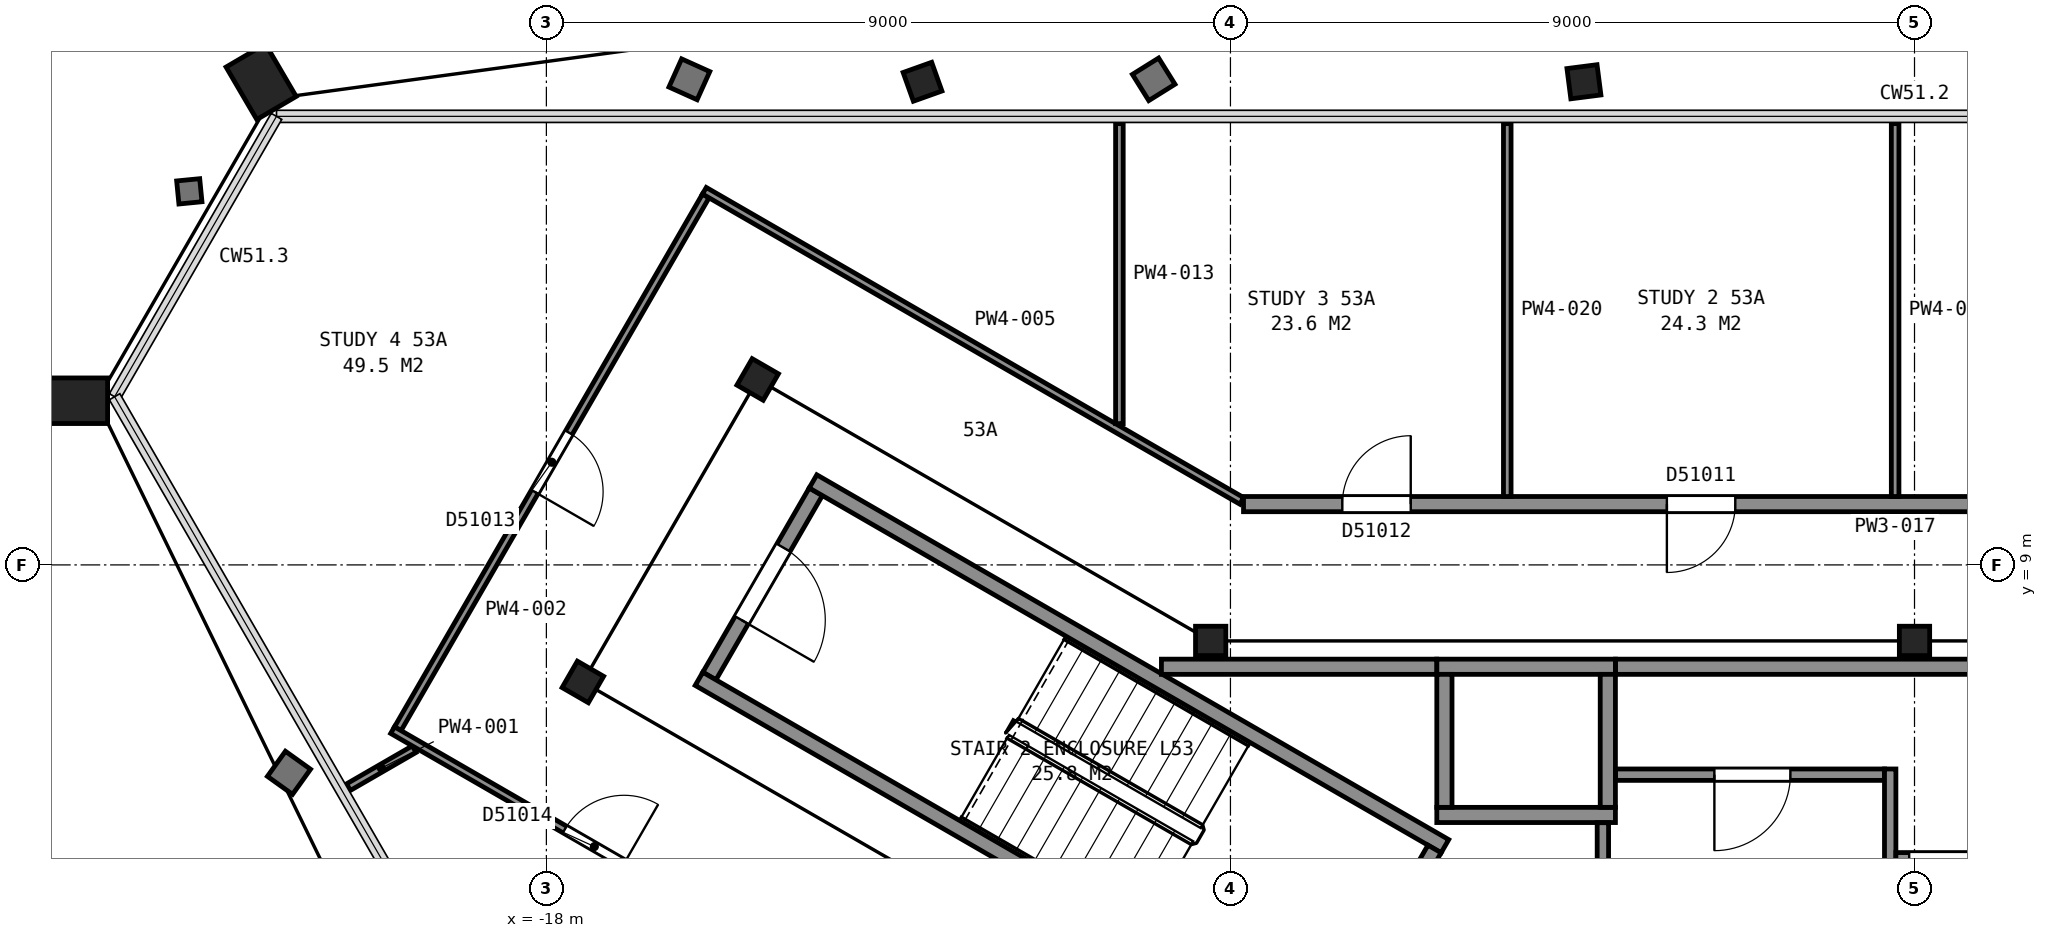
"""IFC4 building model, lengths in metres.
Left out: names, types, materials, properties, quantities, classifications, styles, units other than length and angle.
Written with IfcOpenShell. Run it as: python <this file> out.ifc"""

import sys

from ifc_helpers import new_model, si_unit, direction, frame, frame_2d, origin, origin_2d, place, context, subcontext, project, spatial, rectangle, hollow_rectangle, i_section, extrude, element, fill, save


model = new_model("IFC4")
c1 = context("Model", 3, precision=1e-05, world=origin(), true_north=direction((0.0, 1.0)))
c2 = subcontext(c1, "Body", "Model", "MODEL_VIEW")
j1 = project(units=[si_unit("LENGTHUNIT", "METRE"), si_unit("PLANEANGLEUNIT", "RADIAN")], contexts=[c1])
p1 = place(None, origin())
s1 = spatial("IfcSite", under=j1, at=p1, CompositionType="ELEMENT")
p2 = place(p1, origin())
s2 = spatial("IfcBuilding", under=s1, at=p2, CompositionType="ELEMENT")
p3 = place(p2, frame((0.0, 0.0, 213.8)))
s3 = spatial("IfcBuildingStorey", under=s2, at=p3, CompositionType="ELEMENT", Elevation=213.8)
p4 = place(p3, frame((-4.321, 15.137, 0.035), z_axis=(-0.023914784976, 0.185835055632, 0.982289883465), x_axis=(0.999704292693, 0.000115278447, 0.024316946377)))
e1 = element("IfcColumn", 1, at=p4, inside=s3, PredefinedType="COLUMN", context=c2, shape_type="SweptSolid", body=[
    extrude(i_section(OverallWidth=0.401, OverallDepth=0.399, WebThickness=0.025, FlangeThickness=0.04, FilletRadius=0.015, at=origin_2d()), origin(), (0.0, 0.0, 1.0), 3.696),
])
p5 = place(p3, frame((-12.973, 15.138, 0.04), z_axis=(-0.066255705929, 0.185476302527, 0.980412526762), x_axis=(0.997725155976, 6.7197846e-05, 0.067412970684)))
e2 = element("IfcColumn", 2, at=p5, inside=s3, PredefinedType="COLUMN", context=c2, shape_type="SweptSolid", body=[
    extrude(i_section(OverallWidth=0.401, OverallDepth=0.399, WebThickness=0.025, FlangeThickness=0.04, FilletRadius=0.015, at=origin_2d()), origin(), (0.0, 0.0, 1.0), 3.692),
])
p6 = place(p3, frame((-21.627, 15.142, 0.065), z_axis=(-0.108214891267, 0.184766906942, 0.976806391977), x_axis=(0.497103756844, 0.860970557833, -0.107784755309)))
e3 = element("IfcColumn", 3, at=p6, inside=s3, PredefinedType="COLUMN", context=c2, shape_type="SweptSolid", body=[
    extrude(hollow_rectangle(XDim=0.6, YDim=0.8, WallThickness=0.05, at=origin_2d()), origin(), (0.0, 0.0, 1.0), 3.655),
])
p7 = place(p3, frame((-23.924, 11.16, 0.065), z_axis=(-0.213838328366, 0.0, 0.976869064574), x_axis=(0.497033455356, 0.860883256594, 0.10880148332)))
e4 = element("IfcColumn", 4, at=p7, inside=s3, PredefinedType="COLUMN", context=c2, shape_type="SweptSolid", body=[
    extrude(hollow_rectangle(XDim=0.6, YDim=0.8, WallThickness=0.05, at=origin_2d()), origin(), (0.0, 0.0, 1.0), 3.655),
])
for number, where, z_axis, x_axis in (
    (5, (0.0, 8.0, 0.0), (0.0, 0.0, 1.0), (1.0, 0.0, 0.0)),
    (6, (-9.26, 8.0, 0.0), (0.0, 0.0, 1.0), (1.0, 0.0, 0.0)),
):
    element("IfcColumn", number, at=place(p3, frame(where, z_axis=z_axis, x_axis=x_axis)), inside=s3, PredefinedType="COLUMN", context=c2, shape_type="SweptSolid", body=[
        extrude(i_section(OverallWidth=0.399, OverallDepth=0.386, WebThickness=0.021, FlangeThickness=0.033, FilletRadius=0.015, at=origin_2d()), origin(), (0.0, 0.0, 1.0), 3.7),
    ])
for number, where, z_axis, x_axis in (
    (7, (-15.22, 11.44, 0.0), (0.0, 0.0, 1.0), (0.5, 0.866, 0.0)),
    (8, (-17.52, 7.46, 0.0), (0.0, 0.0, 1.0), (0.5, 0.866, 0.0)),
):
    element("IfcColumn", number, at=place(p3, frame(where, z_axis=z_axis, x_axis=x_axis)), inside=s3, PredefinedType="COLUMN", context=c2, shape_type="SweptSolid", body=[
        extrude(i_section(OverallWidth=0.401, OverallDepth=0.399, WebThickness=0.025, FlangeThickness=0.04, FilletRadius=0.015, at=origin_2d()), origin(), (0.0, 0.0, 1.0), 3.7),
    ])
p8 = place(p3, frame((-14.455, 9.962, 0.0), z_axis=(0.0, 0.0, 1.0), x_axis=(-0.500049511043, -0.865996816683, 0.0)))
e9 = element("IfcWall", 9, at=p8, inside=s3, PredefinedType="PARTITIONING", context=c2, shape_type="SweptSolid", body=[
    extrude(rectangle(XDim=2.8, YDim=0.2, at=frame_2d((1.4, 0.0))), origin(), (0.0, 0.0, 1.0), 3.45),
])
p9 = place(p8, frame((0.85, 0.0, 0.0)))
e10 = element("IfcOpeningElement", 10, at=p9, cuts=e9, PredefinedType="OPENING", context=c2, shape_type="SweptSolid", body=[
    extrude(rectangle(XDim=1.1, YDim=2.1, at=frame_2d((0.55, 1.05))), frame((0.0, 0.11, 0.0), z_axis=(0.0, -1.0, 0.0), x_axis=(1.0, 0.0, 0.0)), (0.0, 0.0, 1.0), 0.22),
])
for number, where, z_axis, x_axis in (
    (11, (-7.678, 2.701, 0.0), (0.0, 0.0, 1.0), (-0.866, 0.5, 0.0)),
    (12, (-6.178, 5.299, 0.0), (0.0, 0.0, 1.0), (-0.866, 0.5, 0.0)),
):
    element("IfcWall", number, at=place(p3, frame(where, z_axis=z_axis, x_axis=x_axis)), inside=s3, PredefinedType="PARTITIONING", context=c2, shape_type="SweptSolid", body=[
        extrude(rectangle(XDim=9.6, YDim=0.2, at=frame_2d((4.8, 0.0))), origin(), (0.0, 0.0, 1.0), 3.45),
    ])
p10 = place(p3, frame((-6.315, 5.262, 0.0), z_axis=(0.0, 0.0, 1.0), x_axis=(-0.500049511043, -0.865996816683, 0.0)))
e13 = element("IfcWall", 13, at=p10, inside=s3, PredefinedType="PARTITIONING", context=c2, shape_type="SweptSolid", body=[
    extrude(rectangle(XDim=2.8, YDim=0.2, at=frame_2d((1.4, 0.0))), origin(), (0.0, 0.0, 1.0), 3.45),
])
for number, where, z_axis, x_axis in (
    (14, (-6.285, 5.71, 0.0), (0.0, 0.0, 1.0), (1.0, 0.0, 0.0)),
    (15, (-6.285, 7.66, 0.0), (0.0, 0.0, 1.0), (1.0, 0.0, 0.0)),
):
    element("IfcWall", number, at=place(p3, frame(where, z_axis=z_axis, x_axis=x_axis)), inside=s3, PredefinedType="PARTITIONING", context=c2, shape_type="SweptSolid", body=[
        extrude(rectangle(XDim=2.35, YDim=0.2, at=frame_2d((1.175, 0.0))), origin(), (0.0, 0.0, 1.0), 3.7),
    ])
for number, where, z_axis, x_axis in (
    (16, (-4.035, 5.81, 0.0), (0.0, 0.0, 1.0), (0.0, 1.0, 0.0)),
    (17, (-6.185, 5.81, 0.0), (0.0, 0.0, 1.0), (0.0, 1.0, 0.0)),
):
    element("IfcWall", number, at=place(p3, frame(where, z_axis=z_axis, x_axis=x_axis)), inside=s3, PredefinedType="PARTITIONING", context=c2, shape_type="SweptSolid", body=[
        extrude(rectangle(XDim=1.75, YDim=0.2, at=frame_2d((0.875, 0.0))), origin(), (0.0, 0.0, 1.0), 3.7),
    ])
p11 = place(p3, frame((-9.908, 7.66, 0.0), z_axis=(0.0, 0.0, 1.0), x_axis=(1.0, 0.0, 0.0)))
e18 = element("IfcWall", 18, at=p11, inside=s3, PredefinedType="PARTITIONING", context=c2, shape_type="SweptSolid", body=[
    extrude(rectangle(XDim=3.621, YDim=0.2, at=frame_2d((1.811, 0.0))), origin(), (0.0, 0.0, 1.0), 3.45),
])
p12 = place(p3, frame((-4.1, 2.085, 0.0), z_axis=(0.0, 0.0, 1.0), x_axis=(0.0, 1.0, 0.0)))
e19 = element("IfcWall", 19, at=p12, inside=s3, PredefinedType="PARTITIONING", context=c2, shape_type="SweptSolid", body=[
    extrude(rectangle(XDim=3.523, YDim=0.15, at=frame_2d((1.761, 0.0))), origin(), (0.0, 0.0, 1.0), 3.45),
])
p13 = place(p3, frame((-3.933, 6.24, 0.0), z_axis=(0.0, 0.0, 1.0), x_axis=(1.0, 0.0, 0.0)))
e20 = element("IfcWall", 20, at=p13, inside=s3, PredefinedType="PARTITIONING", context=c2, shape_type="SweptSolid", body=[
    extrude(rectangle(XDim=3.538, YDim=0.15, at=frame_2d((1.769, 0.0))), origin(), (0.0, 0.0, 1.0), 3.45),
])
p14 = place(p13, frame((1.3, 0.0, 0.0)))
e21 = element("IfcOpeningElement", 21, at=p14, cuts=e20, PredefinedType="OPENING", context=c2, shape_type="SweptSolid", body=[
    extrude(rectangle(XDim=1.0, YDim=2.1, at=frame_2d((0.5, 1.05))), frame((0.0, 0.085, 0.0), z_axis=(0.0, -1.0, 0.0), x_axis=(1.0, 0.0, 0.0)), (0.0, 0.0, 1.0), 0.17),
])
p15 = place(p3, frame((-3.933, 7.66, 0.0), z_axis=(0.0, 0.0, 1.0), x_axis=(1.0, 0.0, 0.0)))
e22 = element("IfcWall", 22, at=p15, inside=s3, PredefinedType="PARTITIONING", context=c2, shape_type="SweptSolid", body=[
    extrude(rectangle(XDim=13.841, YDim=0.2, at=frame_2d((6.92, 0.0))), origin(), (0.0, 0.0, 1.0), 3.45),
])
p16 = place(p3, frame((-0.32, 2.252, 0.0), z_axis=(0.0, 0.0, 1.0), x_axis=(0.0, 1.0, 0.0)))
e23 = element("IfcWall", 23, at=p16, inside=s3, PredefinedType="PARTITIONING", context=c2, shape_type="SweptSolid", body=[
    extrude(rectangle(XDim=4.063, YDim=0.15, at=frame_2d((2.031, 0.0))), origin(), (0.0, 0.0, 1.0), 3.45),
])
p17 = place(p3, frame((-0.245, 5.14, 0.0), z_axis=(0.0, 0.0, 1.0), x_axis=(1.0, 0.0, 0.0)))
e24 = element("IfcWall", 24, at=p17, inside=s3, PredefinedType="PARTITIONING", context=c2, shape_type="SweptSolid", body=[
    extrude(rectangle(XDim=5.11, YDim=0.15, at=frame_2d((2.555, 0.0))), origin(), (0.0, 0.0, 1.0), 3.45),
])
p18 = place(p17, frame((0.175, 0.0, 0.0)))
e25 = element("IfcOpeningElement", 25, at=p18, cuts=e24, PredefinedType="OPENING", context=c2, shape_type="SweptSolid", body=[
    extrude(rectangle(XDim=1.0, YDim=2.1, at=frame_2d((0.5, 1.05))), frame((0.0, 0.085, 0.0), z_axis=(0.0, -1.0, 0.0), x_axis=(1.0, 0.0, 0.0)), (0.0, 0.0, 1.0), 0.17),
])
p19 = place(p3, frame((-20.604, 6.076, 0.0), z_axis=(0.0, 0.0, 1.0), x_axis=(0.865855657918, 0.500293893279, 0.0)))
e26 = element("IfcWall", 26, at=p19, inside=s3, PredefinedType="PARTITIONING", context=c2, shape_type="SweptSolid", body=[
    extrude(rectangle(XDim=0.999, YDim=0.1, at=frame_2d((0.499, 0.0))), origin(), (0.0, 0.0, 1.0), 2.713),
])
p20 = place(p3, frame((-19.955, 6.844, 0.0), z_axis=(0.0, 0.0, 1.0), x_axis=(0.500415732313, 0.865785247537, 0.0)))
e27 = element("IfcWall", 27, at=p20, inside=s3, PredefinedType="PARTITIONING", context=c2, shape_type="SweptSolid", body=[
    extrude(rectangle(XDim=8.097, YDim=0.1, at=frame_2d((4.049, 0.0))), origin(), (0.0, 0.0, 1.0), 2.713),
])
p21 = place(p20, frame((3.6, 0.0, 0.0)))
e28 = element("IfcOpeningElement", 28, at=p21, cuts=e27, PredefinedType="OPENING", context=c2, shape_type="SweptSolid", body=[
    extrude(rectangle(XDim=0.9, YDim=2.1, at=frame_2d((0.45, 1.05))), frame((0.0, 0.06, 0.0), z_axis=(0.0, -1.0, 0.0), x_axis=(1.0, 0.0, 0.0)), (0.0, 0.0, 1.0), 0.12),
])
p22 = place(p3, frame((-12.952, 2.744, 0.0), z_axis=(0.0, 0.0, 1.0), x_axis=(-0.86608949446, 0.499888975259, 0.0)))
e29 = element("IfcWall", 29, at=p22, inside=s3, PredefinedType="PARTITIONING", context=c2, shape_type="SweptSolid", body=[
    extrude(rectangle(XDim=8.165, YDim=0.1, at=frame_2d((4.083, 0.0))), origin(), (0.0, 0.0, 1.0), 2.713),
])
p23 = place(p22, frame((4.65, 0.0, 0.0)))
e30 = element("IfcOpeningElement", 30, at=p23, cuts=e29, PredefinedType="OPENING", context=c2, shape_type="SweptSolid", body=[
    extrude(rectangle(XDim=0.9, YDim=2.1, at=frame_2d((0.45, 1.05))), frame((0.0, 0.06, 0.0), z_axis=(0.0, -1.0, 0.0), x_axis=(1.0, 0.0, 0.0)), (0.0, 0.0, 1.0), 0.12),
])
p24 = place(p22, frame((0.746, 0.0, 0.0)))
e31 = element("IfcOpeningElement", 31, at=p24, cuts=e29, PredefinedType="OPENING", context=c2, shape_type="SweptSolid", body=[
    extrude(rectangle(XDim=0.9, YDim=2.1, at=frame_2d((0.45, 1.05))), frame((0.0, 0.06, 0.0), z_axis=(0.0, -1.0, 0.0), x_axis=(1.0, 0.0, 0.0)), (0.0, 0.0, 1.0), 0.12),
])
p25 = place(p3, frame((-15.921, 13.923, 0.0), z_axis=(0.0, 0.0, 1.0), x_axis=(0.866088973199, -0.499889878377, 0.0)))
e32 = element("IfcWall", 32, at=p25, inside=s3, PredefinedType="PARTITIONING", context=c2, shape_type="SweptSolid", body=[
    extrude(rectangle(XDim=8.163, YDim=0.1, at=frame_2d((4.082, 0.0))), origin(), (0.0, 0.0, 1.0), 2.713),
])
p26 = place(p3, frame((-10.461, 10.859, 0.0), z_axis=(0.0, 0.0, 1.0), x_axis=(0.0, 1.0, 0.0)))
e33 = element("IfcWall", 33, at=p26, inside=s3, PredefinedType="PARTITIONING", context=c2, shape_type="SweptSolid", body=[
    extrude(rectangle(XDim=3.947, YDim=0.1, at=frame_2d((1.974, 0.0))), origin(), (0.0, 0.0, 1.0), 2.713),
])
p27 = place(p3, frame((-8.828, 9.8, 0.0), z_axis=(0.0, 0.0, 1.0), x_axis=(1.0, 0.0, 0.0)))
e34 = element("IfcWall", 34, at=p27, inside=s3, PredefinedType="PARTITIONING", context=c2, shape_type="SweptSolid", body=[
    extrude(rectangle(XDim=17.706, YDim=0.2, at=frame_2d((8.853, 0.0))), origin(), (0.0, 0.0, 1.0), 2.713),
])
p28 = place(p27, frame((14.976, 0.0, 0.0)))
e35 = element("IfcOpeningElement", 35, at=p28, cuts=e34, PredefinedType="OPENING", context=c2, shape_type="SweptSolid", body=[
    extrude(rectangle(XDim=0.9, YDim=2.1, at=frame_2d((0.45, 1.05))), frame((0.0, 0.11, 0.0), z_axis=(0.0, -1.0, 0.0), x_axis=(1.0, 0.0, 0.0)), (0.0, 0.0, 1.0), 0.22),
])
p29 = place(p27, frame((10.673, 0.0, 0.0)))
e36 = element("IfcOpeningElement", 36, at=p29, cuts=e34, PredefinedType="OPENING", context=c2, shape_type="SweptSolid", body=[
    extrude(rectangle(XDim=0.9, YDim=2.1, at=frame_2d((0.45, 1.05))), frame((0.0, 0.11, 0.0), z_axis=(0.0, -1.0, 0.0), x_axis=(1.0, 0.0, 0.0)), (0.0, 0.0, 1.0), 0.22),
])
p30 = place(p27, frame((5.57, 0.0, 0.0)))
e37 = element("IfcOpeningElement", 37, at=p30, cuts=e34, PredefinedType="OPENING", context=c2, shape_type="SweptSolid", body=[
    extrude(rectangle(XDim=0.9, YDim=2.1, at=frame_2d((0.45, 1.05))), frame((0.0, 0.11, 0.0), z_axis=(0.0, -1.0, 0.0), x_axis=(1.0, 0.0, 0.0)), (0.0, 0.0, 1.0), 0.22),
])
p31 = place(p27, frame((1.3, 0.0, 0.0)))
e38 = element("IfcOpeningElement", 38, at=p31, cuts=e34, PredefinedType="OPENING", context=c2, shape_type="SweptSolid", body=[
    extrude(rectangle(XDim=0.9, YDim=2.1, at=frame_2d((0.45, 1.05))), frame((0.0, 0.11, 0.0), z_axis=(0.0, -1.0, 0.0), x_axis=(1.0, 0.0, 0.0)), (0.0, 0.0, 1.0), 0.22),
])
for number, where, z_axis, x_axis in (
    (39, (-5.358, 9.9, 0.0), (0.0, 0.0, 1.0), (0.0, 1.0, 0.0)),
    (40, (-0.255, 9.9, 0.0), (0.0, 0.0, 1.0), (0.0, 1.0, 0.0)),
):
    element("IfcWall", number, at=place(p3, frame(where, z_axis=z_axis, x_axis=x_axis)), inside=s3, PredefinedType="PARTITIONING", context=c2, shape_type="SweptSolid", body=[
        extrude(rectangle(XDim=4.906, YDim=0.1, at=frame_2d((2.453, 0.0))), origin(), (0.0, 0.0, 1.0), 2.713),
    ])
p32 = place(p9, origin())
e41 = element("IfcDoor", 41, at=p32, inside=s3, OperationType="SINGLE_SWING_RIGHT", PredefinedType="DOOR", context=c2, shape_type="SweptSolid", body=[
    extrude(rectangle(XDim=1.1, YDim=2.1, at=frame_2d((0.55, 1.05))), frame((0.0, 0.025, 0.0), z_axis=(0.0, -1.0, 0.0), x_axis=(1.0, 0.0, 0.0)), (0.0, 0.0, 1.0), 0.05),
])
fill(e10, e41)
p33 = place(p14, origin())
e42 = element("IfcDoor", 42, at=p33, inside=s3, OperationType="SINGLE_SWING_LEFT", PredefinedType="DOOR", context=c2, shape_type="SweptSolid", body=[
    extrude(rectangle(XDim=1.0, YDim=2.1, at=frame_2d((0.5, 1.05))), frame((0.0, 0.025, 0.0), z_axis=(0.0, -1.0, 0.0), x_axis=(1.0, 0.0, 0.0)), (0.0, 0.0, 1.0), 0.05),
])
fill(e21, e42)
p34 = place(p18, origin())
e43 = element("IfcDoor", 43, at=p34, inside=s3, OperationType="SINGLE_SWING_LEFT", PredefinedType="DOOR", context=c2, shape_type="SweptSolid", body=[
    extrude(rectangle(XDim=1.0, YDim=2.1, at=frame_2d((0.5, 1.05))), frame((0.0, 0.025, 0.0), z_axis=(0.0, -1.0, 0.0), x_axis=(1.0, 0.0, 0.0)), (0.0, 0.0, 1.0), 0.05),
])
fill(e25, e43)
p35 = place(p21, origin())
e44 = element("IfcDoor", 44, at=p35, inside=s3, OperationType="SINGLE_SWING_LEFT", PredefinedType="DOOR", context=c2, shape_type="SweptSolid", body=[
    extrude(rectangle(XDim=0.9, YDim=2.1, at=frame_2d((0.45, 1.05))), frame((0.0, 0.025, 0.0), z_axis=(0.0, -1.0, 0.0), x_axis=(1.0, 0.0, 0.0)), (0.0, 0.0, 1.0), 0.05),
])
fill(e28, e44)
p36 = place(p23, origin())
e45 = element("IfcDoor", 45, at=p36, inside=s3, OperationType="SINGLE_SWING_LEFT", PredefinedType="DOOR", context=c2, shape_type="SweptSolid", body=[
    extrude(rectangle(XDim=0.9, YDim=2.1, at=frame_2d((0.45, 1.05))), frame((0.0, 0.025, 0.0), z_axis=(0.0, -1.0, 0.0), x_axis=(1.0, 0.0, 0.0)), (0.0, 0.0, 1.0), 0.05),
])
fill(e30, e45)
p37 = place(p30, origin())
e46 = element("IfcDoor", 46, at=p37, inside=s3, OperationType="SINGLE_SWING_LEFT", PredefinedType="DOOR", context=c2, shape_type="SweptSolid", body=[
    extrude(rectangle(XDim=0.9, YDim=2.1, at=frame_2d((0.45, 1.05))), frame((0.0, 0.025, 0.0), z_axis=(0.0, -1.0, 0.0), x_axis=(1.0, 0.0, 0.0)), (0.0, 0.0, 1.0), 0.05),
])
fill(e37, e46)
p38 = place(p31, origin())
e47 = element("IfcDoor", 47, at=p38, inside=s3, OperationType="SINGLE_SWING_RIGHT", PredefinedType="DOOR", context=c2, shape_type="SweptSolid", body=[
    extrude(rectangle(XDim=0.9, YDim=2.1, at=frame_2d((0.45, 1.05))), frame((0.0, 0.025, 0.0), z_axis=(0.0, -1.0, 0.0), x_axis=(1.0, 0.0, 0.0)), (0.0, 0.0, 1.0), 0.05),
])
fill(e38, e47)
save(model, sys.argv[1])
